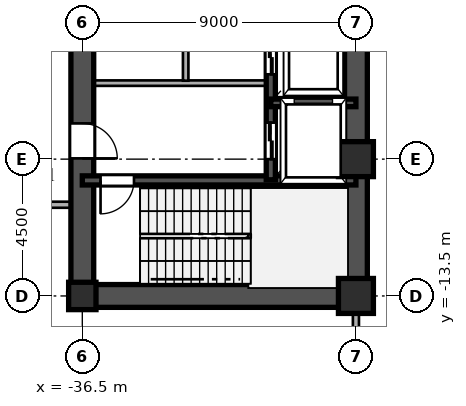
"""IFC4 building model, lengths in metres.
Left out: names, types, materials, properties, quantities, classifications, styles, units other than length and angle.
Written with IfcOpenShell. Run it as: python <this file> out.ifc"""

import sys

from ifc_helpers import new_model, si_unit, direction, frame, frame_2d, origin, origin_2d, place, context, subcontext, project, spatial, rectangle, hollow_rectangle, i_section, extrude, source, transform, mapped, element, fill, save


model = new_model("IFC4")
c1 = context("Model", 3, precision=1e-05, world=origin(), true_north=direction((0.0, 1.0)))
c2 = subcontext(c1, "Body", "Model", "MODEL_VIEW")
j1 = project(units=[si_unit("LENGTHUNIT", "METRE"), si_unit("PLANEANGLEUNIT", "RADIAN")], contexts=[c1])
p1 = place(None, origin())
s1 = spatial("IfcSite", under=j1, at=p1, CompositionType="ELEMENT")
p2 = place(p1, origin())
s2 = spatial("IfcBuilding", under=s1, at=p2, CompositionType="ELEMENT")
p3 = place(p2, frame((0.0, 0.0, -4.8)))
s3 = spatial("IfcBuildingStorey", under=s2, at=p3, CompositionType="ELEMENT", Elevation=-4.8)
m1 = source(origin(), c2, "Body", "SweptSolid", [
    extrude(hollow_rectangle(XDim=1.15, YDim=1.15, WallThickness=0.048, at=origin_2d()), origin(), (0.0, 0.0, 1.0), 4.8),
])
for number, where, z_axis, x_axis in (
    (1, (-27.5, -13.5, 0.0), (0.0, 0.0, 1.0), (1.0, 0.0, 0.0)),
    (2, (-27.5, -9.0, 0.0), (0.0, 0.0, 1.0), (1.0, 0.0, 0.0)),
):
    element("IfcColumn", number, at=place(p3, frame(where, z_axis=z_axis, x_axis=x_axis)), inside=s3, PredefinedType="COLUMN", context=c2, shape_type="MappedRepresentation", body=[
        mapped(m1, transform((0.0, 0.0, 0.0), scale=1.0)),
    ])
m2 = source(origin(), c2, "Body", "SweptSolid", [
    extrude(i_section(OverallWidth=0.9, OverallDepth=0.9, WebThickness=0.036, FlangeThickness=0.055, at=origin_2d()), origin(), (0.0, 0.0, 1.0), 4.8),
])
p4 = place(p3, frame((-36.5, -13.5, 0.0), z_axis=(0.0, 0.0, 1.0), x_axis=(1.0, 0.0, 0.0)))
e3 = element("IfcColumn", 3, at=p4, inside=s3, PredefinedType="COLUMN", context=c2, shape_type="MappedRepresentation", body=[
    mapped(m2, transform((0.0, 0.0, 0.0), scale=1.0)),
])
p5 = place(p3, frame((-27.5, -13.5, 0.0), z_axis=(0.0, 0.0, 1.0), x_axis=(0.0, 1.0, 0.0)))
e4 = element("IfcWall", 4, at=p5, inside=s3, PredefinedType="SHEAR", context=c2, shape_type="SweptSolid", body=[
    extrude(rectangle(XDim=12.2, YDim=0.75, at=frame_2d((6.1, 0.0))), origin(), (0.0, 0.0, 1.0), 4.52),
])
p6 = place(p3, frame((-36.5, -13.5, 0.0), z_axis=(0.0, 0.0, 1.0), x_axis=(1.0, 0.0, 0.0)))
e5 = element("IfcWall", 5, at=p6, inside=s3, PredefinedType="SHEAR", context=c2, shape_type="SweptSolid", body=[
    extrude(rectangle(XDim=9.0, YDim=0.75, at=frame_2d((4.5, 0.0))), origin(), (0.0, 0.0, 1.0), 4.52),
])
p7 = place(p3, frame((-36.5, -13.65, 0.0), z_axis=(0.0, 0.0, 1.0), x_axis=(0.0, 1.0, 0.0)))
e6 = element("IfcWall", 6, at=p7, inside=s3, PredefinedType="SHEAR", context=c2, shape_type="SweptSolid", body=[
    extrude(rectangle(XDim=7.15, YDim=0.75, at=frame_2d((3.575, 0.0))), origin(), (0.0, 0.0, 1.0), 4.52),
])
p8 = place(p7, frame((4.675, 0.0, 0.0)))
e7 = element("IfcOpeningElement", 7, at=p8, cuts=e6, PredefinedType="OPENING", context=c2, shape_type="SweptSolid", body=[
    extrude(rectangle(XDim=1.15, YDim=2.2, at=frame_2d((0.575, 1.1))), frame((0.0, 0.385, 0.0), z_axis=(0.0, -1.0, 0.0), x_axis=(1.0, 0.0, 0.0)), (0.0, 0.0, 1.0), 0.77),
])
p9 = place(p3, frame((-36.5, -6.5, 0.0), z_axis=(0.0, 0.0, 1.0), x_axis=(0.0, 1.0, 0.0)))
e8 = element("IfcWall", 8, at=p9, inside=s3, PredefinedType="SHEAR", context=c2, shape_type="SweptSolid", body=[
    extrude(rectangle(XDim=5.2, YDim=0.75, at=frame_2d((2.6, 0.0))), origin(), (0.0, 0.0, 1.0), 4.52),
])
p10 = place(p9, frame((2.125, 0.0, 0.0)))
e9 = element("IfcOpeningElement", 9, at=p10, cuts=e8, PredefinedType="OPENING", context=c2, shape_type="SweptSolid", body=[
    extrude(rectangle(XDim=0.95, YDim=2.15, at=frame_2d((0.475, 1.075))), frame((0.0, 0.385, 0.0), z_axis=(0.0, -1.0, 0.0), x_axis=(1.0, 0.0, 0.0)), (0.0, 0.0, 1.0), 0.77),
])
p11 = place(p3, frame((-36.5, -9.7, 0.0), z_axis=(0.0, 0.0, 1.0), x_axis=(1.0, 0.0, 0.0)))
e10 = element("IfcWall", 10, at=p11, inside=s3, PredefinedType="SHEAR", context=c2, shape_type="SweptSolid", body=[
    extrude(rectangle(XDim=9.0, YDim=0.3, at=frame_2d((4.5, 0.0))), origin(), (0.0, 0.0, 1.0), 4.52),
])
p12 = place(p11, frame((0.6, 0.0, 0.0)))
e11 = element("IfcOpeningElement", 11, at=p12, cuts=e10, PredefinedType="OPENING", context=c2, shape_type="SweptSolid", body=[
    extrude(rectangle(XDim=1.1, YDim=2.2, at=frame_2d((0.55, 1.1))), frame((0.0, 0.16, 0.0), z_axis=(0.0, -1.0, 0.0), x_axis=(1.0, 0.0, 0.0)), (0.0, 0.0, 1.0), 0.32),
])
p13 = place(p3, frame((-30.3, -7.15, 0.0), z_axis=(0.0, 0.0, 1.0), x_axis=(1.0, 0.0, 0.0)))
e12 = element("IfcWall", 12, at=p13, inside=s3, PredefinedType="SHEAR", context=c2, shape_type="SweptSolid", body=[
    extrude(rectangle(XDim=2.8, YDim=0.25, at=frame_2d((1.4, 0.0))), origin(), (0.0, 0.0, 1.0), 4.52),
])
p14 = place(p3, frame((-30.3, -9.68, 0.0), z_axis=(0.0, 0.0, 1.0), x_axis=(0.0, 1.0, 0.0)))
e13 = element("IfcWall", 13, at=p14, inside=s3, PredefinedType="SHEAR", context=c2, shape_type="SweptSolid", body=[
    extrude(rectangle(XDim=2.56, YDim=0.3, at=frame_2d((1.28, 0.0))), origin(), (0.0, 0.0, 1.0), 4.52),
])
p15 = place(p14, frame((0.68, 0.0, 0.0)))
e14 = element("IfcOpeningElement", 14, at=p15, cuts=e13, PredefinedType="OPENING", context=c2, shape_type="SweptSolid", body=[
    extrude(rectangle(XDim=1.2, YDim=2.25, at=frame_2d((0.6, 1.125))), frame((0.0, 0.16, 0.0), z_axis=(0.0, -1.0, 0.0), x_axis=(1.0, 0.0, 0.0)), (0.0, 0.0, 1.0), 0.32),
])
p16 = place(p3, frame((-30.3, -7.12, 0.0), z_axis=(0.0, 0.0, 1.0), x_axis=(0.0, 1.0, 0.0)))
e15 = element("IfcWall", 15, at=p16, inside=s3, PredefinedType="SHEAR", context=c2, shape_type="SweptSolid", body=[
    extrude(rectangle(XDim=2.92, YDim=0.3, at=frame_2d((1.46, 0.0))), origin(), (0.0, 0.0, 1.0), 4.52),
])
p17 = place(p16, frame((0.91, 0.0, 0.0)))
e16 = element("IfcOpeningElement", 16, at=p17, cuts=e15, PredefinedType="OPENING", context=c2, shape_type="SweptSolid", body=[
    extrude(rectangle(XDim=1.1, YDim=2.2, at=frame_2d((0.55, 1.1))), frame((0.0, 0.16, 0.0), z_axis=(0.0, -1.0, 0.0), x_axis=(1.0, 0.0, 0.0)), (0.0, 0.0, 1.0), 0.32),
])
p18 = place(p3, frame((-36.15, -6.5, 0.0), z_axis=(0.0, 0.0, 1.0), x_axis=(1.0, 0.0, 0.0)))
e17 = element("IfcWall", 17, at=p18, inside=s3, PredefinedType="PARTITIONING", context=c2, shape_type="SweptSolid", body=[
    extrude(rectangle(XDim=5.7, YDim=0.18, at=frame_2d((2.85, 0.0))), origin(), (0.0, 0.0, 1.0), 4.52),
])
p19 = place(p3, frame((-33.1, -6.42, 0.0), z_axis=(0.0, 0.0, 1.0), x_axis=(0.0, 1.0, 0.0)))
e18 = element("IfcWall", 18, at=p19, inside=s3, PredefinedType="PARTITIONING", context=c2, shape_type="SweptSolid", body=[
    extrude(rectangle(XDim=5.04, YDim=0.18, at=frame_2d((2.52, 0.0))), origin(), (0.0, 0.0, 1.0), 4.52),
])
p20 = place(p3, frame((-38.915, -10.5, 0.0), z_axis=(0.0, 0.0, 1.0), x_axis=(1.0, 0.0, 0.0)))
e19 = element("IfcWall", 19, at=p20, inside=s3, PredefinedType="PARTITIONING", context=c2, shape_type="SweptSolid", body=[
    extrude(rectangle(XDim=2.035, YDim=0.2, at=frame_2d((1.018, 0.0))), origin(), (0.0, 0.0, 1.0), 4.52),
])
p21 = place(p3, frame((-27.5, -21.812, 0.0), z_axis=(0.0, 0.0, 1.0), x_axis=(0.0, 1.0, 0.0)))
e20 = element("IfcWall", 20, at=p21, inside=s3, PredefinedType="PARTITIONING", context=c2, shape_type="SweptSolid", body=[
    extrude(rectangle(XDim=7.933, YDim=0.2, at=frame_2d((3.966, 0.0))), origin(), (0.0, 0.0, 1.0), 3.932),
])
m3 = source(origin(), c2, "Body", "SweptSolid", [
    extrude(rectangle(XDim=1.15, YDim=2.2, at=frame_2d((0.575, 1.1))), frame((0.0, 0.025, 0.0), z_axis=(0.0, -1.0, 0.0), x_axis=(1.0, 0.0, 0.0)), (0.0, 0.0, 1.0), 0.05),
])
p22 = place(p8, frame((1.15, 0.0, 0.0), z_axis=(0.0, 0.0, 1.0), x_axis=(-1.0, 0.0, 0.0)))
e21 = element("IfcDoor", 21, at=p22, inside=s3, OperationType="SINGLE_SWING_LEFT", PredefinedType="DOOR", context=c2, shape_type="MappedRepresentation", body=[
    mapped(m3, transform((0.0, 0.0, 0.0), scale=1.0)),
])
fill(e7, e21)
m4 = source(origin(), c2, "Body", "SweptSolid", [
    extrude(rectangle(XDim=1.1, YDim=2.2, at=frame_2d((0.55, 1.1))), frame((0.0, 0.025, 0.0), z_axis=(0.0, -1.0, 0.0), x_axis=(1.0, 0.0, 0.0)), (0.0, 0.0, 1.0), 0.05),
])
p23 = place(p12, frame((1.1, 0.0, 0.0), z_axis=(0.0, 0.0, 1.0), x_axis=(-1.0, 0.0, 0.0)))
e22 = element("IfcDoor", 22, at=p23, inside=s3, OperationType="SINGLE_SWING_LEFT", PredefinedType="DOOR", context=c2, shape_type="MappedRepresentation", body=[
    mapped(m4, transform((0.0, 0.0, 0.0), scale=1.0)),
])
fill(e11, e22)
m5 = source(origin(), c2, "Body", "SweptSolid", [
    extrude(rectangle(XDim=1.2, YDim=2.25, at=frame_2d((0.6, 1.125))), frame((0.0, 0.025, 0.0), z_axis=(0.0, -1.0, 0.0), x_axis=(1.0, 0.0, 0.0)), (0.0, 0.0, 1.0), 0.05),
])
p24 = place(p15, origin())
e23 = element("IfcDoor", 23, at=p24, inside=s3, OperationType="DOUBLE_DOOR_SLIDING", PredefinedType="DOOR", context=c2, shape_type="MappedRepresentation", body=[
    mapped(m5, transform((0.0, 0.0, 0.0), scale=1.0)),
])
fill(e14, e23)
m6 = source(origin(), c2, "Body", "SweptSolid", [
    extrude(rectangle(XDim=1.1, YDim=2.2, at=frame_2d((0.55, 1.1))), frame((0.0, 0.025, 0.0), z_axis=(0.0, -1.0, 0.0), x_axis=(1.0, 0.0, 0.0)), (0.0, 0.0, 1.0), 0.05),
])
p25 = place(p17, origin())
e24 = element("IfcDoor", 24, at=p25, inside=s3, OperationType="DOUBLE_DOOR_SLIDING", PredefinedType="DOOR", context=c2, shape_type="MappedRepresentation", body=[
    mapped(m6, transform((0.0, 0.0, 0.0), scale=1.0)),
])
fill(e16, e24)
save(model, sys.argv[1])
